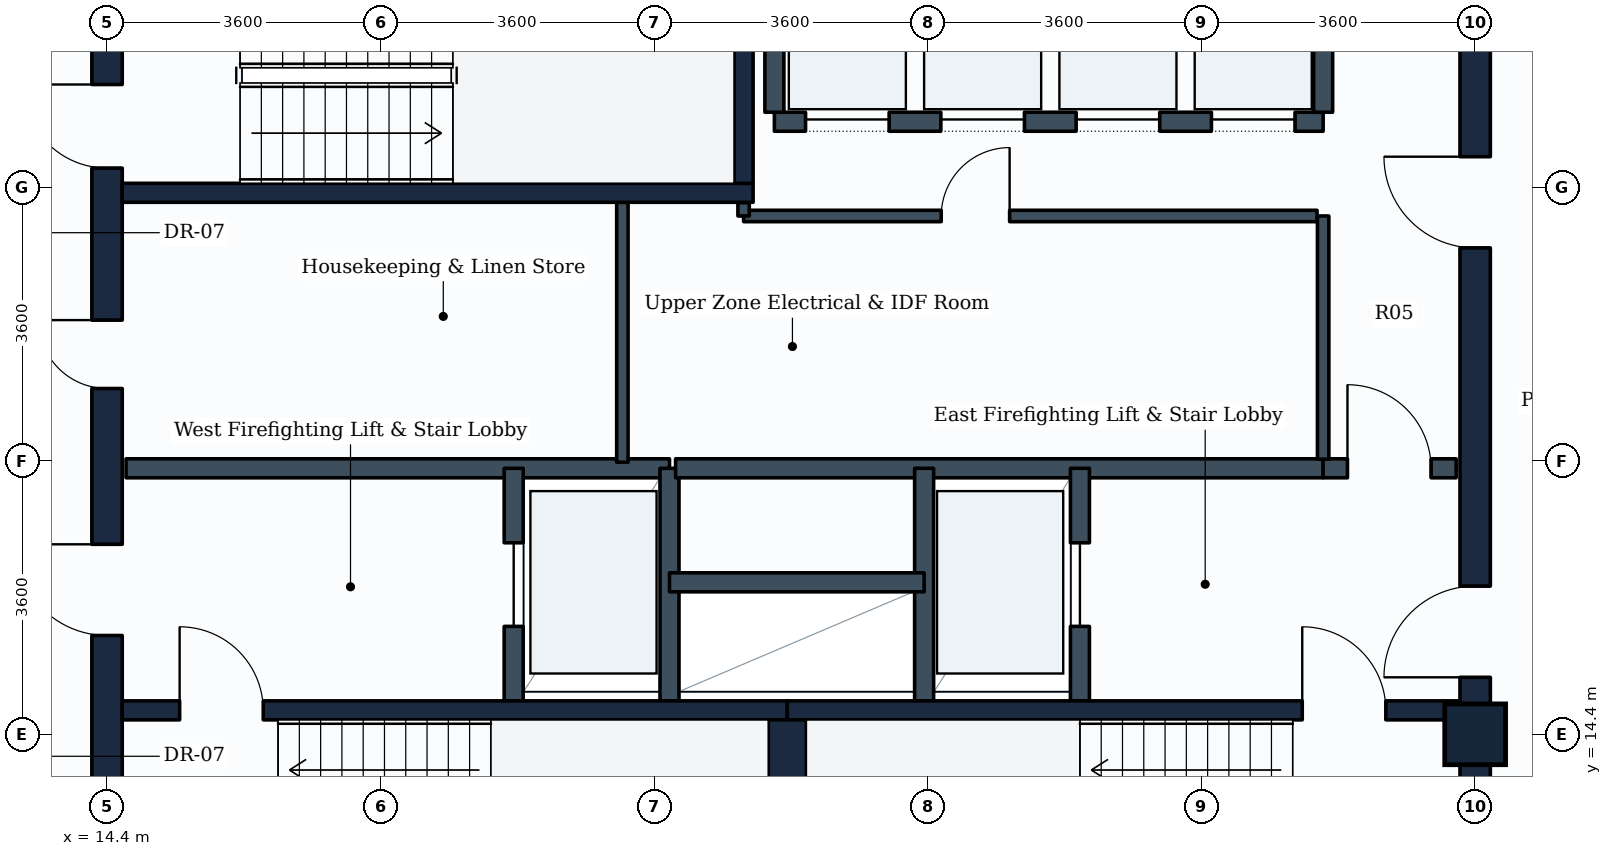
"""IFC4 building model, lengths in metres.
Left out: names, types, materials, properties, quantities, classifications, styles, units other than length and angle.
Written with IfcOpenShell. Run it as: python <this file> out.ifc"""

import sys

from ifc_helpers import new_model, si_unit, direction, frame, frame_2d, origin, origin_2d, place, context, subcontext, project, spatial, rectangle, extrude, element, fill, save


model = new_model("IFC4")
c1 = context("Model", 3, precision=1e-05, world=origin(), true_north=direction((0.0, 1.0)))
c2 = subcontext(c1, "Body", "Model", "MODEL_VIEW")
j1 = project(units=[si_unit("LENGTHUNIT", "METRE"), si_unit("PLANEANGLEUNIT", "RADIAN")], contexts=[c1])
p1 = place(None, origin())
s1 = spatial("IfcSite", under=j1, at=p1, CompositionType="ELEMENT")
p2 = place(p1, origin())
s2 = spatial("IfcBuilding", under=s1, at=p2, CompositionType="ELEMENT")
p3 = place(p2, frame((0.0, 0.0, 231.8)))
s3 = spatial("IfcBuildingStorey", under=s2, at=p3, CompositionType="ELEMENT", Elevation=231.8)
p4 = place(p3, frame((32.4, 14.4, 0.0), z_axis=(0.0, 0.0, 1.0), x_axis=(1.0, 0.0, 0.0)))
e1 = element("IfcColumn", 1, at=p4, inside=s3, PredefinedType="COLUMN", context=c2, shape_type="SweptSolid", body=[
    extrude(rectangle(XDim=0.8, YDim=0.8, at=origin_2d()), origin(), (0.0, 0.0, 1.0), 3.6),
])
p5 = place(p3, frame((14.4, 10.8, 0.0), z_axis=(0.0, 0.0, 1.0), x_axis=(0.0, 1.0, 0.0)))
e2 = element("IfcWall", 2, at=p5, inside=s3, PredefinedType="SHEAR", context=c2, shape_type="SweptSolid", body=[
    extrude(rectangle(XDim=14.4, YDim=0.4, at=frame_2d((7.2, 0.0))), origin(), (0.0, 0.0, 1.0), 3.35),
])
p6 = place(p5, frame((11.05, 0.0, 0.0)))
e3 = element("IfcOpeningElement", 3, at=p6, cuts=e2, PredefinedType="OPENING", context=c2, shape_type="SweptSolid", body=[
    extrude(rectangle(XDim=1.1, YDim=2.1, at=frame_2d((0.55, 1.05))), frame((0.0, 0.21, 0.0), z_axis=(0.0, -1.0, 0.0), x_axis=(1.0, 0.0, 0.0)), (0.0, 0.0, 1.0), 0.42),
])
p7 = place(p5, frame((4.9, 0.0, 0.0)))
e4 = element("IfcOpeningElement", 4, at=p7, cuts=e2, PredefinedType="OPENING", context=c2, shape_type="SweptSolid", body=[
    extrude(rectangle(XDim=1.2, YDim=2.1, at=frame_2d((0.6, 1.05))), frame((0.0, 0.21, 0.0), z_axis=(0.0, -1.0, 0.0), x_axis=(1.0, 0.0, 0.0)), (0.0, 0.0, 1.0), 0.42),
])
p8 = place(p5, frame((8.15, 0.0, 0.0)))
e5 = element("IfcOpeningElement", 5, at=p8, cuts=e2, PredefinedType="OPENING", context=c2, shape_type="SweptSolid", body=[
    extrude(rectangle(XDim=0.9, YDim=2.1, at=frame_2d((0.45, 1.05))), frame((0.0, 0.21, 0.0), z_axis=(0.0, -1.0, 0.0), x_axis=(1.0, 0.0, 0.0)), (0.0, 0.0, 1.0), 0.42),
])
p9 = place(p3, frame((32.4, 10.8, 0.0), z_axis=(0.0, 0.0, 1.0), x_axis=(0.0, 1.0, 0.0)))
e6 = element("IfcWall", 6, at=p9, inside=s3, PredefinedType="SHEAR", context=c2, shape_type="SweptSolid", body=[
    extrude(rectangle(XDim=14.4, YDim=0.4, at=frame_2d((7.2, 0.0))), origin(), (0.0, 0.0, 1.0), 3.35),
])
p10 = place(p9, frame((4.35, 0.0, 0.0)))
e7 = element("IfcOpeningElement", 7, at=p10, cuts=e6, PredefinedType="OPENING", context=c2, shape_type="SweptSolid", body=[
    extrude(rectangle(XDim=1.2, YDim=2.1, at=frame_2d((0.6, 1.05))), frame((0.0, 0.21, 0.0), z_axis=(0.0, -1.0, 0.0), x_axis=(1.0, 0.0, 0.0)), (0.0, 0.0, 1.0), 0.42),
])
p11 = place(p9, frame((10.0, 0.0, 0.0)))
e8 = element("IfcOpeningElement", 8, at=p11, cuts=e6, PredefinedType="OPENING", context=c2, shape_type="SweptSolid", body=[
    extrude(rectangle(XDim=1.2, YDim=2.1, at=frame_2d((0.6, 1.05))), frame((0.0, 0.21, 0.0), z_axis=(0.0, -1.0, 0.0), x_axis=(1.0, 0.0, 0.0)), (0.0, 0.0, 1.0), 0.42),
])
p12 = place(p3, frame((14.6, 14.715, 0.0), z_axis=(0.0, 0.0, 1.0), x_axis=(1.0, 0.0, 0.0)))
e9 = element("IfcWall", 9, at=p12, inside=s3, PredefinedType="SHEAR", context=c2, shape_type="SweptSolid", body=[
    extrude(rectangle(XDim=8.75, YDim=0.25, at=frame_2d((4.375, 0.0))), origin(), (0.0, 0.0, 1.0), 3.35),
])
p13 = place(p12, frame((0.755, 0.0, 0.0)))
e10 = element("IfcOpeningElement", 10, at=p13, cuts=e9, PredefinedType="OPENING", context=c2, shape_type="SweptSolid", body=[
    extrude(rectangle(XDim=1.1, YDim=2.1, at=frame_2d((0.55, 1.05))), frame((0.0, 0.135, 0.0), z_axis=(0.0, -1.0, 0.0), x_axis=(1.0, 0.0, 0.0)), (0.0, 0.0, 1.0), 0.27),
])
p14 = place(p3, frame((23.35, 14.715, 0.0), z_axis=(0.0, 0.0, 1.0), x_axis=(1.0, 0.0, 0.0)))
e11 = element("IfcWall", 11, at=p14, inside=s3, PredefinedType="SHEAR", context=c2, shape_type="SweptSolid", body=[
    extrude(rectangle(XDim=8.85, YDim=0.25, at=frame_2d((4.425, 0.0))), origin(), (0.0, 0.0, 1.0), 3.35),
])
p15 = place(p14, frame((6.775, 0.0, 0.0)))
e12 = element("IfcOpeningElement", 12, at=p15, cuts=e11, PredefinedType="OPENING", context=c2, shape_type="SweptSolid", body=[
    extrude(rectangle(XDim=1.1, YDim=2.1, at=frame_2d((0.55, 1.05))), frame((0.0, 0.135, 0.0), z_axis=(0.0, -1.0, 0.0), x_axis=(1.0, 0.0, 0.0)), (0.0, 0.0, 1.0), 0.27),
])
p16 = place(p3, frame((23.35, 11.75, 0.0), z_axis=(0.0, 0.0, 1.0), x_axis=(0.0, 1.0, 0.0)))
e13 = element("IfcWall", 13, at=p16, inside=s3, PredefinedType="SHEAR", context=c2, shape_type="SweptSolid", body=[
    extrude(rectangle(XDim=2.84, YDim=0.5, at=frame_2d((1.42, 0.0))), origin(), (0.0, 0.0, 1.0), 3.35),
])
p17 = place(p3, frame((14.6, 21.525, 0.0), z_axis=(0.0, 0.0, 1.0), x_axis=(1.0, 0.0, 0.0)))
e14 = element("IfcWall", 14, at=p17, inside=s3, PredefinedType="SHEAR", context=c2, shape_type="SweptSolid", body=[
    extrude(rectangle(XDim=8.3, YDim=0.25, at=frame_2d((4.15, 0.0))), origin(), (0.0, 0.0, 1.0), 3.35),
])
p18 = place(p3, frame((22.775, 21.65, 0.0), z_axis=(0.0, 0.0, 1.0), x_axis=(0.0, 1.0, 0.0)))
e15 = element("IfcWall", 15, at=p18, inside=s3, PredefinedType="SHEAR", context=c2, shape_type="SweptSolid", body=[
    extrude(rectangle(XDim=2.84, YDim=0.25, at=frame_2d((1.42, 0.0))), origin(), (0.0, 0.0, 1.0), 3.35),
])
p19 = place(p3, frame((14.65, 17.9, 0.0), z_axis=(0.0, 0.0, 1.0), x_axis=(1.0, 0.0, 0.0)))
e16 = element("IfcWall", 16, at=p19, inside=s3, PredefinedType="PARTITIONING", context=c2, shape_type="SweptSolid", body=[
    extrude(rectangle(XDim=7.15, YDim=0.25, at=frame_2d((3.575, 0.0))), origin(), (0.0, 0.0, 1.0), 3.335),
])
p20 = place(p3, frame((19.75, 14.84, 0.0), z_axis=(0.0, 0.0, 1.0), x_axis=(0.0, 1.0, 0.0)))
e17 = element("IfcWall", 17, at=p20, inside=s3, PredefinedType="PARTITIONING", context=c2, shape_type="SweptSolid", body=[
    extrude(rectangle(XDim=3.06, YDim=0.25, at=frame_2d((1.53, 0.0))), origin(), (0.0, 0.0, 1.0), 3.335),
])
p21 = place(p20, frame((0.98, 0.0, 0.0)))
e18 = element("IfcOpeningElement", 18, at=p21, cuts=e17, PredefinedType="OPENING", context=c2, shape_type="SweptSolid", body=[
    extrude(rectangle(XDim=1.1, YDim=2.1, at=frame_2d((0.55, 1.05))), frame((0.0, 0.135, 0.0), z_axis=(0.0, -1.0, 0.0), x_axis=(1.0, 0.0, 0.0)), (0.0, 0.0, 1.0), 0.27),
])
p22 = place(p3, frame((21.8, 14.84, 0.0), z_axis=(0.0, 0.0, 1.0), x_axis=(0.0, 1.0, 0.0)))
e19 = element("IfcWall", 19, at=p22, inside=s3, PredefinedType="PARTITIONING", context=c2, shape_type="SweptSolid", body=[
    extrude(rectangle(XDim=3.06, YDim=0.25, at=frame_2d((1.53, 0.0))), origin(), (0.0, 0.0, 1.0), 3.335),
])
p23 = place(p3, frame((21.88, 17.9, 0.0), z_axis=(0.0, 0.0, 1.0), x_axis=(1.0, 0.0, 0.0)))
e20 = element("IfcWall", 20, at=p23, inside=s3, PredefinedType="PARTITIONING", context=c2, shape_type="SweptSolid", body=[
    extrude(rectangle(XDim=8.52, YDim=0.25, at=frame_2d((4.26, 0.0))), origin(), (0.0, 0.0, 1.0), 3.335),
])
p24 = place(p3, frame((30.4, 17.9, 0.0), z_axis=(0.0, 0.0, 1.0), x_axis=(1.0, 0.0, 0.0)))
e21 = element("IfcWall", 21, at=p24, inside=s3, PredefinedType="PARTITIONING", context=c2, shape_type="SweptSolid", body=[
    extrude(rectangle(XDim=1.75, YDim=0.25, at=frame_2d((0.875, 0.0))), origin(), (0.0, 0.0, 1.0), 3.335),
])
p25 = place(p24, frame((0.32, 0.0, 0.0)))
e22 = element("IfcOpeningElement", 22, at=p25, cuts=e21, PredefinedType="OPENING", context=c2, shape_type="SweptSolid", body=[
    extrude(rectangle(XDim=1.1, YDim=2.1, at=frame_2d((0.55, 1.05))), frame((0.0, 0.135, 0.0), z_axis=(0.0, -1.0, 0.0), x_axis=(1.0, 0.0, 0.0)), (0.0, 0.0, 1.0), 0.27),
])
p26 = place(p3, frame((25.15, 14.84, 0.0), z_axis=(0.0, 0.0, 1.0), x_axis=(0.0, 1.0, 0.0)))
e23 = element("IfcWall", 23, at=p26, inside=s3, PredefinedType="PARTITIONING", context=c2, shape_type="SweptSolid", body=[
    extrude(rectangle(XDim=3.06, YDim=0.25, at=frame_2d((1.53, 0.0))), origin(), (0.0, 0.0, 1.0), 3.335),
])
p27 = place(p3, frame((27.2, 14.84, 0.0), z_axis=(0.0, 0.0, 1.0), x_axis=(0.0, 1.0, 0.0)))
e24 = element("IfcWall", 24, at=p27, inside=s3, PredefinedType="PARTITIONING", context=c2, shape_type="SweptSolid", body=[
    extrude(rectangle(XDim=3.06, YDim=0.25, at=frame_2d((1.53, 0.0))), origin(), (0.0, 0.0, 1.0), 3.335),
])
p28 = place(p27, frame((0.98, 0.0, 0.0)))
e25 = element("IfcOpeningElement", 25, at=p28, cuts=e24, PredefinedType="OPENING", context=c2, shape_type="SweptSolid", body=[
    extrude(rectangle(XDim=1.1, YDim=2.1, at=frame_2d((0.55, 1.05))), frame((0.0, 0.135, 0.0), z_axis=(0.0, -1.0, 0.0), x_axis=(1.0, 0.0, 0.0)), (0.0, 0.0, 1.0), 0.27),
])
p29 = place(p3, frame((21.8, 16.4, 0.0), z_axis=(0.0, 0.0, 1.0), x_axis=(1.0, 0.0, 0.0)))
e26 = element("IfcWall", 26, at=p29, inside=s3, PredefinedType="PARTITIONING", context=c2, shape_type="SweptSolid", body=[
    extrude(rectangle(XDim=3.35, YDim=0.25, at=frame_2d((1.675, 0.0))), origin(), (0.0, 0.0, 1.0), 3.335),
])
p30 = place(p3, frame((23.18, 22.46, 0.0), z_axis=(0.0, 0.0, 1.0), x_axis=(1.0, 0.0, 0.0)))
e27 = element("IfcWall", 27, at=p30, inside=s3, PredefinedType="PARTITIONING", context=c2, shape_type="SweptSolid", body=[
    extrude(rectangle(XDim=7.22, YDim=0.25, at=frame_2d((3.61, 0.0))), origin(), (0.0, 0.0, 1.0), 3.335),
])
p31 = place(p30, frame((0.41, 0.0, 0.0)))
e28 = element("IfcOpeningElement", 28, at=p31, cuts=e27, PredefinedType="OPENING", context=c2, shape_type="SweptSolid", body=[
    extrude(rectangle(XDim=1.1, YDim=2.1, at=frame_2d((0.55, 1.05))), frame((0.0, 0.135, 0.0), z_axis=(0.0, -1.0, 0.0), x_axis=(1.0, 0.0, 0.0)), (0.0, 0.0, 1.0), 0.27),
])
p32 = place(p30, frame((2.19, 0.0, 0.0)))
e29 = element("IfcOpeningElement", 29, at=p32, cuts=e27, PredefinedType="OPENING", context=c2, shape_type="SweptSolid", body=[
    extrude(rectangle(XDim=1.1, YDim=2.1, at=frame_2d((0.55, 1.05))), frame((0.0, 0.135, 0.0), z_axis=(0.0, -1.0, 0.0), x_axis=(1.0, 0.0, 0.0)), (0.0, 0.0, 1.0), 0.27),
])
p33 = place(p30, frame((3.97, 0.0, 0.0)))
e30 = element("IfcOpeningElement", 30, at=p33, cuts=e27, PredefinedType="OPENING", context=c2, shape_type="SweptSolid", body=[
    extrude(rectangle(XDim=1.1, YDim=2.1, at=frame_2d((0.55, 1.05))), frame((0.0, 0.135, 0.0), z_axis=(0.0, -1.0, 0.0), x_axis=(1.0, 0.0, 0.0)), (0.0, 0.0, 1.0), 0.27),
])
p34 = place(p30, frame((5.75, 0.0, 0.0)))
e31 = element("IfcOpeningElement", 31, at=p34, cuts=e27, PredefinedType="OPENING", context=c2, shape_type="SweptSolid", body=[
    extrude(rectangle(XDim=1.1, YDim=2.1, at=frame_2d((0.55, 1.05))), frame((0.0, 0.135, 0.0), z_axis=(0.0, -1.0, 0.0), x_axis=(1.0, 0.0, 0.0)), (0.0, 0.0, 1.0), 0.27),
])
for number, where, z_axis, x_axis in (
    (32, (23.18, 22.585, 0.0), (0.0, 0.0, 1.0), (0.0, 1.0, 0.0)),
    (33, (30.4, 22.585, 0.0), (0.0, 0.0, 1.0), (0.0, 1.0, 0.0)),
):
    element("IfcWall", number, at=place(p3, frame(where, z_axis=z_axis, x_axis=x_axis)), inside=s3, PredefinedType="PARTITIONING", context=c2, shape_type="SweptSolid", body=[
        extrude(rectangle(XDim=2.315, YDim=0.25, at=frame_2d((1.157, 0.0))), origin(), (0.0, 0.0, 1.0), 3.335),
    ])
p35 = place(p3, frame((22.775, 21.22, 0.0), z_axis=(0.0, 0.0, 1.0), x_axis=(1.0, 0.0, 0.0)))
e34 = element("IfcWall", 34, at=p35, inside=s3, PredefinedType="PARTITIONING", context=c2, shape_type="SweptSolid", body=[
    extrude(rectangle(XDim=7.545, YDim=0.15, at=frame_2d((3.772, 0.0))), origin(), (0.0, 0.0, 1.0), 3.335),
])
p36 = place(p35, frame((2.6, 0.0, 0.0)))
e35 = element("IfcOpeningElement", 35, at=p36, cuts=e34, PredefinedType="OPENING", context=c2, shape_type="SweptSolid", body=[
    extrude(rectangle(XDim=0.9, YDim=2.1, at=frame_2d((0.45, 1.05))), frame((0.0, 0.085, 0.0), z_axis=(0.0, -1.0, 0.0), x_axis=(1.0, 0.0, 0.0)), (0.0, 0.0, 1.0), 0.17),
])
p37 = place(p3, frame((22.775, 21.22, 0.0), z_axis=(0.0, 0.0, 1.0), x_axis=(0.0, 1.0, 0.0)))
e36 = element("IfcWall", 36, at=p37, inside=s3, PredefinedType="PARTITIONING", context=c2, shape_type="SweptSolid", body=[
    extrude(rectangle(XDim=0.175, YDim=0.15, at=frame_2d((0.087, 0.0))), origin(), (0.0, 0.0, 1.0), 3.335),
])
p38 = place(p3, frame((30.4, 18.02, 0.0), z_axis=(0.0, 0.0, 1.0), x_axis=(0.0, 1.0, 0.0)))
e37 = element("IfcWall", 37, at=p38, inside=s3, PredefinedType="PARTITIONING", context=c2, shape_type="SweptSolid", body=[
    extrude(rectangle(XDim=3.2, YDim=0.15, at=frame_2d((1.6, 0.0))), origin(), (0.0, 0.0, 1.0), 3.335),
])
p39 = place(p3, frame((21.18, 17.98, 0.0), z_axis=(0.0, 0.0, 1.0), x_axis=(0.0, 1.0, 0.0)))
e38 = element("IfcWall", 38, at=p39, inside=s3, PredefinedType="PARTITIONING", context=c2, shape_type="SweptSolid", body=[
    extrude(rectangle(XDim=3.42, YDim=0.15, at=frame_2d((1.71, 0.0))), origin(), (0.0, 0.0, 1.0), 3.335),
])
p40 = place(p13, origin())
e39 = element("IfcDoor", 39, at=p40, inside=s3, OperationType="SINGLE_SWING_LEFT", PredefinedType="DOOR", context=c2, shape_type="SweptSolid", body=[
    extrude(rectangle(XDim=1.1, YDim=2.1, at=frame_2d((0.55, 1.05))), frame((0.0, 0.025, 0.0), z_axis=(0.0, -1.0, 0.0), x_axis=(1.0, 0.0, 0.0)), (0.0, 0.0, 1.0), 0.05),
])
fill(e10, e39)
p41 = place(p15, origin())
e40 = element("IfcDoor", 40, at=p41, inside=s3, OperationType="SINGLE_SWING_LEFT", PredefinedType="DOOR", context=c2, shape_type="SweptSolid", body=[
    extrude(rectangle(XDim=1.1, YDim=2.1, at=frame_2d((0.55, 1.05))), frame((0.0, 0.025, 0.0), z_axis=(0.0, -1.0, 0.0), x_axis=(1.0, 0.0, 0.0)), (0.0, 0.0, 1.0), 0.05),
])
fill(e12, e40)
p42 = place(p6, origin())
e41 = element("IfcDoor", 41, at=p42, inside=s3, OperationType="SINGLE_SWING_RIGHT", PredefinedType="DOOR", context=c2, shape_type="SweptSolid", body=[
    extrude(rectangle(XDim=1.1, YDim=2.1, at=frame_2d((0.55, 1.05))), frame((0.0, 0.025, 0.0), z_axis=(0.0, -1.0, 0.0), x_axis=(1.0, 0.0, 0.0)), (0.0, 0.0, 1.0), 0.05),
])
fill(e3, e41)
p43 = place(p21, origin())
e42 = element("IfcDoor", 42, at=p43, inside=s3, OperationType="SLIDING_TO_LEFT", PredefinedType="DOOR", context=c2, shape_type="SweptSolid", body=[
    extrude(rectangle(XDim=1.1, YDim=2.1, at=frame_2d((0.55, 1.05))), frame((0.0, 0.025, 0.0), z_axis=(0.0, -1.0, 0.0), x_axis=(1.0, 0.0, 0.0)), (0.0, 0.0, 1.0), 0.05),
])
fill(e18, e42)
p44 = place(p28, origin())
e43 = element("IfcDoor", 43, at=p44, inside=s3, OperationType="SLIDING_TO_LEFT", PredefinedType="DOOR", context=c2, shape_type="SweptSolid", body=[
    extrude(rectangle(XDim=1.1, YDim=2.1, at=frame_2d((0.55, 1.05))), frame((0.0, 0.025, 0.0), z_axis=(0.0, -1.0, 0.0), x_axis=(1.0, 0.0, 0.0)), (0.0, 0.0, 1.0), 0.05),
])
fill(e25, e43)
p45 = place(p7, origin())
e44 = element("IfcDoor", 44, at=p45, inside=s3, OperationType="SINGLE_SWING_RIGHT", PredefinedType="DOOR", context=c2, shape_type="SweptSolid", body=[
    extrude(rectangle(XDim=1.2, YDim=2.1, at=frame_2d((0.6, 1.05))), frame((0.0, 0.025, 0.0), z_axis=(0.0, -1.0, 0.0), x_axis=(1.0, 0.0, 0.0)), (0.0, 0.0, 1.0), 0.05),
])
fill(e4, e44)
p46 = place(p10, origin())
e45 = element("IfcDoor", 45, at=p46, inside=s3, OperationType="SINGLE_SWING_LEFT", PredefinedType="DOOR", context=c2, shape_type="SweptSolid", body=[
    extrude(rectangle(XDim=1.2, YDim=2.1, at=frame_2d((0.6, 1.05))), frame((0.0, 0.025, 0.0), z_axis=(0.0, -1.0, 0.0), x_axis=(1.0, 0.0, 0.0)), (0.0, 0.0, 1.0), 0.05),
])
fill(e7, e45)
p47 = place(p25, origin())
e46 = element("IfcDoor", 46, at=p47, inside=s3, OperationType="SINGLE_SWING_LEFT", PredefinedType="DOOR", context=c2, shape_type="SweptSolid", body=[
    extrude(rectangle(XDim=1.1, YDim=2.1, at=frame_2d((0.55, 1.05))), frame((0.0, 0.025, 0.0), z_axis=(0.0, -1.0, 0.0), x_axis=(1.0, 0.0, 0.0)), (0.0, 0.0, 1.0), 0.05),
])
fill(e22, e46)
p48 = place(p31, origin())
e47 = element("IfcDoor", 47, at=p48, inside=s3, OperationType="SLIDING_TO_LEFT", PredefinedType="DOOR", context=c2, shape_type="SweptSolid", body=[
    extrude(rectangle(XDim=1.1, YDim=2.1, at=frame_2d((0.55, 1.05))), frame((0.0, 0.025, 0.0), z_axis=(0.0, -1.0, 0.0), x_axis=(1.0, 0.0, 0.0)), (0.0, 0.0, 1.0), 0.05),
])
fill(e28, e47)
p49 = place(p32, origin())
e48 = element("IfcDoor", 48, at=p49, inside=s3, OperationType="SLIDING_TO_LEFT", PredefinedType="DOOR", context=c2, shape_type="SweptSolid", body=[
    extrude(rectangle(XDim=1.1, YDim=2.1, at=frame_2d((0.55, 1.05))), frame((0.0, 0.025, 0.0), z_axis=(0.0, -1.0, 0.0), x_axis=(1.0, 0.0, 0.0)), (0.0, 0.0, 1.0), 0.05),
])
fill(e29, e48)
p50 = place(p33, origin())
e49 = element("IfcDoor", 49, at=p50, inside=s3, OperationType="SLIDING_TO_LEFT", PredefinedType="DOOR", context=c2, shape_type="SweptSolid", body=[
    extrude(rectangle(XDim=1.1, YDim=2.1, at=frame_2d((0.55, 1.05))), frame((0.0, 0.025, 0.0), z_axis=(0.0, -1.0, 0.0), x_axis=(1.0, 0.0, 0.0)), (0.0, 0.0, 1.0), 0.05),
])
fill(e30, e49)
p51 = place(p34, origin())
e50 = element("IfcDoor", 50, at=p51, inside=s3, OperationType="SLIDING_TO_LEFT", PredefinedType="DOOR", context=c2, shape_type="SweptSolid", body=[
    extrude(rectangle(XDim=1.1, YDim=2.1, at=frame_2d((0.55, 1.05))), frame((0.0, 0.025, 0.0), z_axis=(0.0, -1.0, 0.0), x_axis=(1.0, 0.0, 0.0)), (0.0, 0.0, 1.0), 0.05),
])
fill(e31, e50)
p52 = place(p11, origin())
e51 = element("IfcDoor", 51, at=p52, inside=s3, OperationType="SINGLE_SWING_RIGHT", PredefinedType="DOOR", context=c2, shape_type="SweptSolid", body=[
    extrude(rectangle(XDim=1.2, YDim=2.1, at=frame_2d((0.6, 1.05))), frame((0.0, 0.025, 0.0), z_axis=(0.0, -1.0, 0.0), x_axis=(1.0, 0.0, 0.0)), (0.0, 0.0, 1.0), 0.05),
])
fill(e8, e51)
p53 = place(p8, origin())
e52 = element("IfcDoor", 52, at=p53, inside=s3, OperationType="SINGLE_SWING_RIGHT", PredefinedType="DOOR", context=c2, shape_type="SweptSolid", body=[
    extrude(rectangle(XDim=0.9, YDim=2.1, at=frame_2d((0.45, 1.05))), frame((0.0, 0.025, 0.0), z_axis=(0.0, -1.0, 0.0), x_axis=(1.0, 0.0, 0.0)), (0.0, 0.0, 1.0), 0.05),
])
fill(e5, e52)
p54 = place(p36, origin())
e53 = element("IfcDoor", 53, at=p54, inside=s3, OperationType="SINGLE_SWING_RIGHT", PredefinedType="DOOR", context=c2, shape_type="SweptSolid", body=[
    extrude(rectangle(XDim=0.9, YDim=2.1, at=frame_2d((0.45, 1.05))), frame((0.0, 0.025, 0.0), z_axis=(0.0, -1.0, 0.0), x_axis=(1.0, 0.0, 0.0)), (0.0, 0.0, 1.0), 0.05),
])
fill(e35, e53)
save(model, sys.argv[1])
